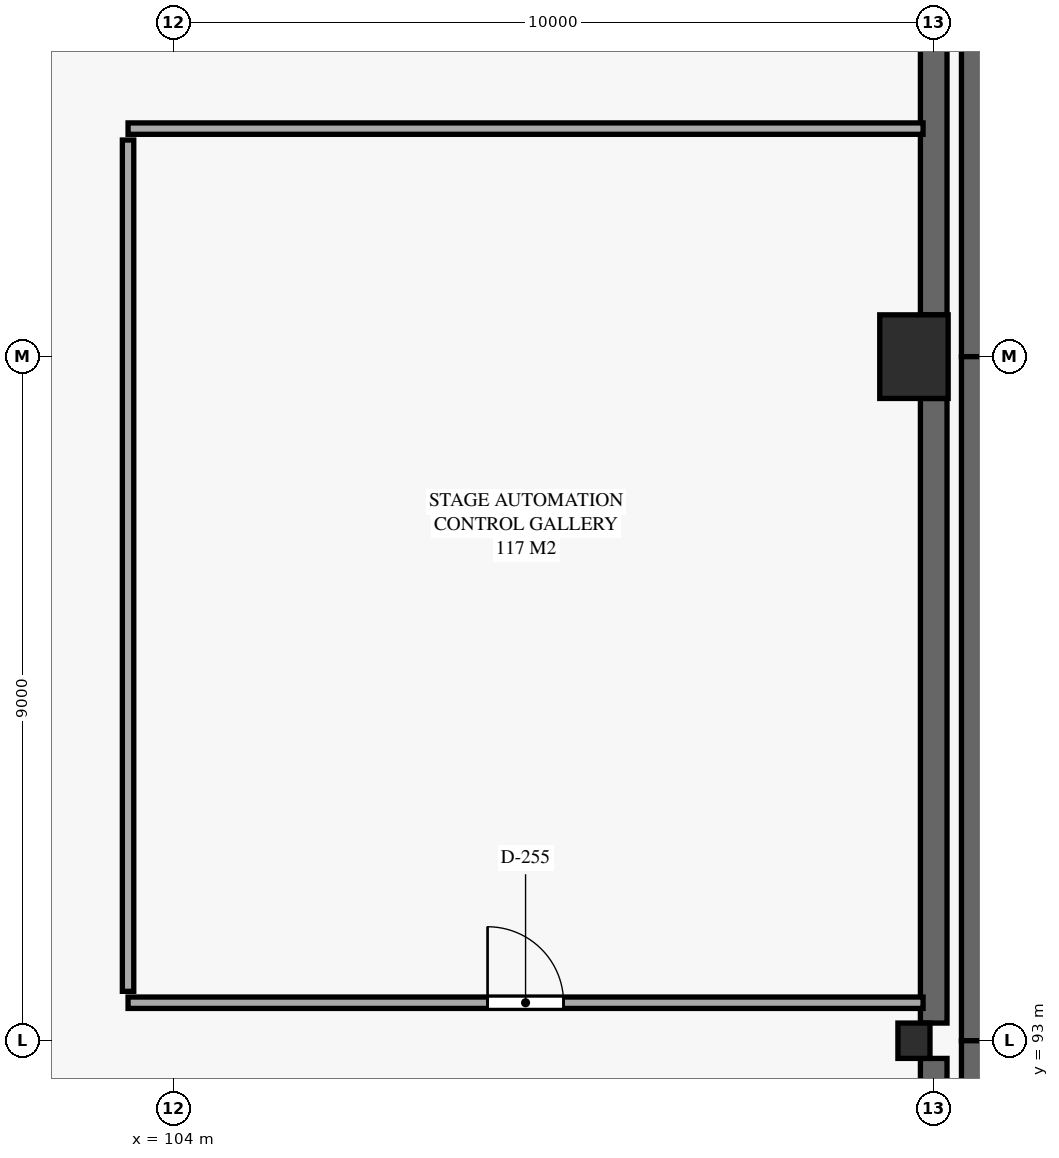
"""IFC4 building model, lengths in metres.
Left out: names, types, materials, properties, quantities, classifications, styles, units other than length and angle.
Written with IfcOpenShell. Run it as: python <this file> out.ifc"""

import sys

from ifc_helpers import new_model, si_unit, direction, frame, frame_2d, origin, origin_2d, place, context, subcontext, project, spatial, rectangle, i_section, extrude, element, fill, save


model = new_model("IFC4")
c1 = context("Model", 3, precision=1e-05, world=origin(), true_north=direction((0.0, 1.0)))
c2 = subcontext(c1, "Body", "Model", "MODEL_VIEW")
j1 = project(units=[si_unit("LENGTHUNIT", "METRE"), si_unit("PLANEANGLEUNIT", "RADIAN")], contexts=[c1])
p1 = place(None, origin())
s1 = spatial("IfcSite", under=j1, at=p1, CompositionType="ELEMENT")
p2 = place(p1, origin())
s2 = spatial("IfcBuilding", under=s1, at=p2, CompositionType="ELEMENT")
p3 = place(p2, frame((0.0, 0.0, 29.6)))
s3 = spatial("IfcBuildingStorey", under=s2, at=p3, CompositionType="ELEMENT", Elevation=29.6)
p4 = place(p3, frame((113.74, 93.0, 0.0), z_axis=(0.0, 0.0, 1.0), x_axis=(1.0, 0.0, 0.0)))
e1 = element("IfcColumn", 1, at=p4, inside=s3, PredefinedType="COLUMN", context=c2, shape_type="SweptSolid", body=[
    extrude(i_section(OverallWidth=0.422, OverallDepth=0.465, WebThickness=0.045, FlangeThickness=0.073, FilletRadius=0.02, at=origin_2d()), origin(), (0.0, 0.0, 1.0), 4.6),
])
p5 = place(p3, frame((113.74, 102.0, 0.0), z_axis=(0.0, 0.0, 1.0), x_axis=(1.0, 0.0, 0.0)))
e2 = element("IfcColumn", 2, at=p5, inside=s3, PredefinedType="COLUMN", context=c2, shape_type="SweptSolid", body=[
    extrude(rectangle(XDim=0.9, YDim=1.1, at=origin_2d()), origin(), (0.0, 0.0, 1.0), 4.6),
])
p6 = place(p3, frame((114.0, 90.2, 0.0), z_axis=(0.0, 0.0, 1.0), x_axis=(0.0, 1.0, 0.0)))
e3 = element("IfcWall", 3, at=p6, inside=s3, PredefinedType="SHEAR", context=c2, shape_type="SweptSolid", body=[
    extrude(rectangle(XDim=2.568, YDim=0.35, at=frame_2d((1.284, 0.0))), origin(), (0.0, 0.0, 1.0), 4.35),
])
p7 = place(p3, frame((114.0, 93.232, 0.0), z_axis=(0.0, 0.0, 1.0), x_axis=(0.0, 1.0, 0.0)))
e4 = element("IfcWall", 4, at=p7, inside=s3, PredefinedType="SHEAR", context=c2, shape_type="SweptSolid", body=[
    extrude(rectangle(XDim=8.218, YDim=0.35, at=frame_2d((4.109, 0.0))), origin(), (0.0, 0.0, 1.0), 4.35),
])
p8 = place(p3, frame((114.0, 102.55, 0.0), z_axis=(0.0, 0.0, 1.0), x_axis=(0.0, 1.0, 0.0)))
e5 = element("IfcWall", 5, at=p8, inside=s3, PredefinedType="SHEAR", context=c2, shape_type="SweptSolid", body=[
    extrude(rectangle(XDim=5.25, YDim=0.35, at=frame_2d((2.625, 0.0))), origin(), (0.0, 0.0, 1.0), 4.35),
])
p9 = place(p3, frame((114.54, 110.0, 0.0), z_axis=(0.0, 0.0, 1.0), x_axis=(0.0, -1.0, 0.0)))
e6 = element("IfcWall", 6, at=p9, inside=s3, PredefinedType="SHEAR", context=c2, shape_type="SweptSolid", body=[
    extrude(rectangle(XDim=8.0, YDim=0.35, at=frame_2d((4.0, 0.0))), origin(), (0.0, 0.0, 1.0), 4.35),
])
p10 = place(p3, frame((114.54, 102.0, 0.0), z_axis=(0.0, 0.0, 1.0), x_axis=(0.0, -1.0, 0.0)))
e7 = element("IfcWall", 7, at=p10, inside=s3, PredefinedType="SHEAR", context=c2, shape_type="SweptSolid", body=[
    extrude(rectangle(XDim=9.0, YDim=0.35, at=frame_2d((4.5, 0.0))), origin(), (0.0, 0.0, 1.0), 4.35),
])
p11 = place(p3, frame((114.54, 93.0, 0.0), z_axis=(0.0, 0.0, 1.0), x_axis=(0.0, -1.0, 0.0)))
e8 = element("IfcWall", 8, at=p11, inside=s3, PredefinedType="SHEAR", context=c2, shape_type="SweptSolid", body=[
    extrude(rectangle(XDim=9.68, YDim=0.35, at=frame_2d((4.84, 0.0))), origin(), (0.0, 0.0, 1.0), 4.35),
])
p12 = place(p3, frame((103.4, 93.5, 0.0), z_axis=(0.0, 0.0, 1.0), x_axis=(1.0, 0.0, 0.0)))
e9 = element("IfcWall", 9, at=p12, inside=s3, PredefinedType="PARTITIONING", context=c2, shape_type="SweptSolid", body=[
    extrude(rectangle(XDim=10.46, YDim=0.15, at=frame_2d((5.23, 0.0))), origin(), (0.0, 0.0, 1.0), 4.35),
])
p13 = place(p12, frame((4.73, 0.0, 0.0)))
e10 = element("IfcOpeningElement", 10, at=p13, cuts=e9, PredefinedType="OPENING", context=c2, shape_type="SweptSolid", body=[
    extrude(rectangle(XDim=1.0, YDim=2.15, at=frame_2d((0.5, 1.075))), frame((0.0, 0.085, 0.0), z_axis=(0.0, -1.0, 0.0), x_axis=(1.0, 0.0, 0.0)), (0.0, 0.0, 1.0), 0.17),
])
p14 = place(p3, frame((113.86, 105.0, 0.0), z_axis=(0.0, 0.0, 1.0), x_axis=(-1.0, 0.0, 0.0)))
e11 = element("IfcWall", 11, at=p14, inside=s3, PredefinedType="PARTITIONING", context=c2, shape_type="SweptSolid", body=[
    extrude(rectangle(XDim=10.46, YDim=0.15, at=frame_2d((5.23, 0.0))), origin(), (0.0, 0.0, 1.0), 4.35),
])
p15 = place(p3, frame((103.4, 104.85, 0.0), z_axis=(0.0, 0.0, 1.0), x_axis=(0.0, -1.0, 0.0)))
e12 = element("IfcWall", 12, at=p15, inside=s3, PredefinedType="PARTITIONING", context=c2, shape_type="SweptSolid", body=[
    extrude(rectangle(XDim=11.2, YDim=0.15, at=frame_2d((5.6, 0.0))), origin(), (0.0, 0.0, 1.0), 4.38),
])
p16 = place(p13, origin())
e13 = element("IfcDoor", 13, at=p16, inside=s3, OperationType="SINGLE_SWING_LEFT", PredefinedType="DOOR", context=c2, shape_type="SweptSolid", body=[
    extrude(rectangle(XDim=1.0, YDim=2.15, at=frame_2d((0.5, 1.075))), frame((0.0, 0.025, 0.0), z_axis=(0.0, -1.0, 0.0), x_axis=(1.0, 0.0, 0.0)), (0.0, 0.0, 1.0), 0.05),
])
fill(e10, e13)
save(model, sys.argv[1])
